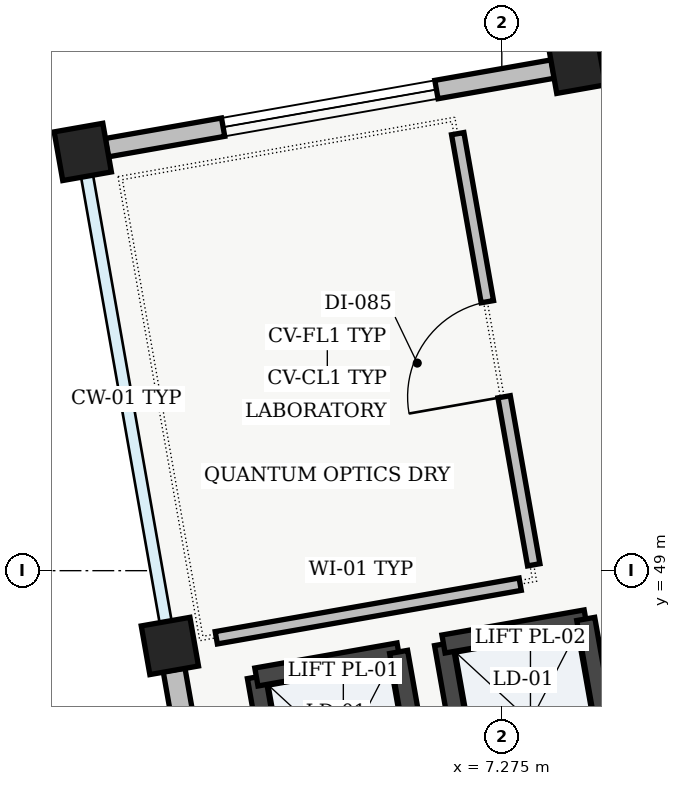
"""IFC4 building model, lengths in metres.
Left out: names, types, materials, properties, quantities, classifications, styles, units other than length and angle.
Written with IfcOpenShell. Run it as: python <this file> out.ifc"""

import sys

from ifc_helpers import new_model, si_unit, direction, frame, frame_2d, origin, origin_2d, place, context, subcontext, project, spatial, rectangle, extrude, element, fill, save


model = new_model("IFC4")
c1 = context("Model", 3, precision=1e-05, world=origin(), true_north=direction((0.0, 1.0)))
c2 = subcontext(c1, "Body", "Model", "MODEL_VIEW")
j1 = project(units=[si_unit("LENGTHUNIT", "METRE"), si_unit("PLANEANGLEUNIT", "RADIAN")], contexts=[c1])
p1 = place(None, origin())
s1 = spatial("IfcSite", under=j1, at=p1, CompositionType="ELEMENT")
p2 = place(p1, origin())
s2 = spatial("IfcBuilding", under=s1, at=p2, CompositionType="ELEMENT")
p3 = place(p2, frame((0.0, 0.0, 9.6)))
s3 = spatial("IfcBuildingStorey", under=s2, at=p3, CompositionType="ELEMENT", Elevation=9.6)
for number, where, z_axis, x_axis in (
    (1, (2.908, 48.01, 0.0), (0.0, 0.0, 1.0), (0.985, 0.174, 0.0)),
    (2, (1.762, 54.509, 0.0), (0.0, 0.0, 1.0), (0.985, 0.174, 0.0)),
    (3, (8.261, 55.655, 0.0), (0.0, 0.0, 1.0), (0.985, 0.174, 0.0)),
):
    element("IfcColumn", number, at=place(p3, frame(where, z_axis=z_axis, x_axis=x_axis)), inside=s3, PredefinedType="COLUMN", context=c2, shape_type="SweptSolid", body=[
        extrude(rectangle(XDim=0.65, YDim=0.65, at=origin_2d()), origin(), (0.0, 0.0, 1.0), 4.32),
    ])
p4 = place(p3, frame((3.998, 41.825, 0.0), z_axis=(0.0, 0.0, 1.0), x_axis=(-0.173645120828, 0.98480829201, 0.0)))
e4 = element("IfcWall", 4, at=p4, inside=s3, PredefinedType="STANDARD", context=c2, shape_type="SweptSolid", body=[
    extrude(rectangle(XDim=5.96, YDim=0.29, at=frame_2d((2.98, 0.0))), origin(), (0.0, 0.0, 1.0), 3.855),
])
p5 = place(p4, frame((2.34, 0.0, 0.95)))
e5 = element("IfcOpeningElement", 5, at=p5, cuts=e4, PredefinedType="OPENING", context=c2, shape_type="SweptSolid", body=[
    extrude(rectangle(XDim=1.28, YDim=1.42, at=frame_2d((0.64, 0.71))), frame((0.0, 0.145, 0.0), z_axis=(0.0, -1.0, 0.0), x_axis=(1.0, 0.0, 0.0)), (0.0, 0.0, 1.0), 0.29),
])
p6 = place(p3, frame((2.077, 54.565, 0.0), z_axis=(0.0, 0.0, 1.0), x_axis=(0.98480829201, 0.173645120828, 0.0)))
e6 = element("IfcWall", 6, at=p6, inside=s3, PredefinedType="STANDARD", context=c2, shape_type="SweptSolid", body=[
    extrude(rectangle(XDim=5.96, YDim=0.245, at=frame_2d((2.98, 0.0))), origin(), (0.0, 0.0, 1.0), 3.855),
])
p7 = place(p6, frame((1.555, 0.0, 0.95)))
e7 = element("IfcOpeningElement", 7, at=p7, cuts=e6, PredefinedType="OPENING", context=c2, shape_type="SweptSolid", body=[
    extrude(rectangle(XDim=2.85, YDim=1.5, at=frame_2d((1.425, 0.75))), frame((0.0, 0.123, 0.0), z_axis=(0.0, -1.0, 0.0), x_axis=(1.0, 0.0, 0.0)), (0.0, 0.0, 1.0), 0.245),
])
p8 = place(p3, frame((4.463, 45.237, 0.0), z_axis=(0.0, 0.0, 1.0), x_axis=(-0.173646056486, 0.984808127031, 0.0)))
e8 = element("IfcWall", 8, at=p8, inside=s3, PredefinedType="SHEAR", context=c2, shape_type="SweptSolid", body=[
    extrude(rectangle(XDim=2.4, YDim=0.24, at=frame_2d((1.2, 0.0))), origin(), (0.0, 0.0, 1.0), 4.28),
])
p9 = place(p3, frame((4.046, 47.601, 0.0), z_axis=(0.0, 0.0, 1.0), x_axis=(0.984793905749, 0.173726691098, 0.0)))
e9 = element("IfcWall", 9, at=p9, inside=s3, PredefinedType="SHEAR", context=c2, shape_type="SweptSolid", body=[
    extrude(rectangle(XDim=1.9, YDim=0.24, at=frame_2d((0.95, 0.0))), origin(), (0.0, 0.0, 1.0), 4.28),
])
for number, where, z_axis, x_axis in (
    (10, (5.917, 47.931, 0.0), (0.0, 0.0, 1.0), (0.174, -0.985, 0.0)),
    (11, (6.925, 45.671, 0.0), (0.0, 0.0, 1.0), (-0.174, 0.985, 0.0)),
):
    element("IfcWall", number, at=place(p3, frame(where, z_axis=z_axis, x_axis=x_axis)), inside=s3, PredefinedType="SHEAR", context=c2, shape_type="SweptSolid", body=[
        extrude(rectangle(XDim=2.4, YDim=0.24, at=frame_2d((1.2, 0.0))), origin(), (0.0, 0.0, 1.0), 4.28),
    ])
p10 = place(p3, frame((6.508, 48.035, 0.0), z_axis=(0.0, 0.0, 1.0), x_axis=(0.984793905749, 0.173726691098, 0.0)))
e12 = element("IfcWall", 12, at=p10, inside=s3, PredefinedType="SHEAR", context=c2, shape_type="SweptSolid", body=[
    extrude(rectangle(XDim=1.9, YDim=0.24, at=frame_2d((0.95, 0.0))), origin(), (0.0, 0.0, 1.0), 4.28),
])
p11 = place(p3, frame((8.379, 48.365, 0.0), z_axis=(0.0, 0.0, 1.0), x_axis=(0.173646056486, -0.984808127031, 0.0)))
e13 = element("IfcWall", 13, at=p11, inside=s3, PredefinedType="SHEAR", context=c2, shape_type="SweptSolid", body=[
    extrude(rectangle(XDim=2.4, YDim=0.24, at=frame_2d((1.2, 0.0))), origin(), (0.0, 0.0, 1.0), 4.28),
])
p12 = place(p3, frame((3.518, 48.117, 0.0), z_axis=(0.0, 0.0, 1.0), x_axis=(0.984816834462, 0.173596666326, 0.0)))
e14 = element("IfcWall", 14, at=p12, inside=s3, PredefinedType="PARTITIONING", context=c2, shape_type="SweptSolid", body=[
    extrude(rectangle(XDim=4.06, YDim=0.165, at=frame_2d((2.03, 0.0))), origin(), (0.0, 0.0, 1.0), 3.655),
])
p13 = place(p3, frame((7.695, 49.077, 0.0), z_axis=(0.0, 0.0, 1.0), x_axis=(-0.173649928941, 0.984807444214, 0.0)))
e15 = element("IfcWall", 15, at=p13, inside=s3, PredefinedType="PARTITIONING", context=c2, shape_type="SweptSolid", body=[
    extrude(rectangle(XDim=5.76, YDim=0.165, at=frame_2d((2.88, 0.0))), origin(), (0.0, 0.0, 1.0), 3.95),
])
p14 = place(p13, frame((2.245, 0.0, 0.0)))
e16 = element("IfcOpeningElement", 16, at=p14, cuts=e15, PredefinedType="OPENING", context=c2, shape_type="SweptSolid", body=[
    extrude(rectangle(XDim=1.27, YDim=2.08, at=frame_2d((0.635, 1.04))), frame((0.0, 0.083, 0.0), z_axis=(0.0, -1.0, 0.0), x_axis=(1.0, 0.0, 0.0)), (0.0, 0.0, 1.0), 0.165),
])
p15 = place(p7, origin())
e17 = element("IfcWindow", 17, at=p15, inside=s3, PartitioningType="SINGLE_PANEL", PredefinedType="WINDOW", context=c2, shape_type="SweptSolid", body=[
    extrude(rectangle(XDim=2.85, YDim=1.5, at=frame_2d((1.425, 0.75))), frame((0.0, 0.03, 0.0), z_axis=(0.0, -1.0, 0.0), x_axis=(1.0, 0.0, 0.0)), (0.0, 0.0, 1.0), 0.06),
])
fill(e7, e17)
p16 = place(p14, origin())
e18 = element("IfcDoor", 18, at=p16, inside=s3, OperationType="SINGLE_SWING_LEFT", PredefinedType="DOOR", context=c2, shape_type="SweptSolid", body=[
    extrude(rectangle(XDim=1.27, YDim=2.08, at=frame_2d((0.635, 1.04))), frame((0.0, 0.025, 0.0), z_axis=(0.0, -1.0, 0.0), x_axis=(1.0, 0.0, 0.0)), (0.0, 0.0, 1.0), 0.05),
])
fill(e16, e18)
save(model, sys.argv[1])
